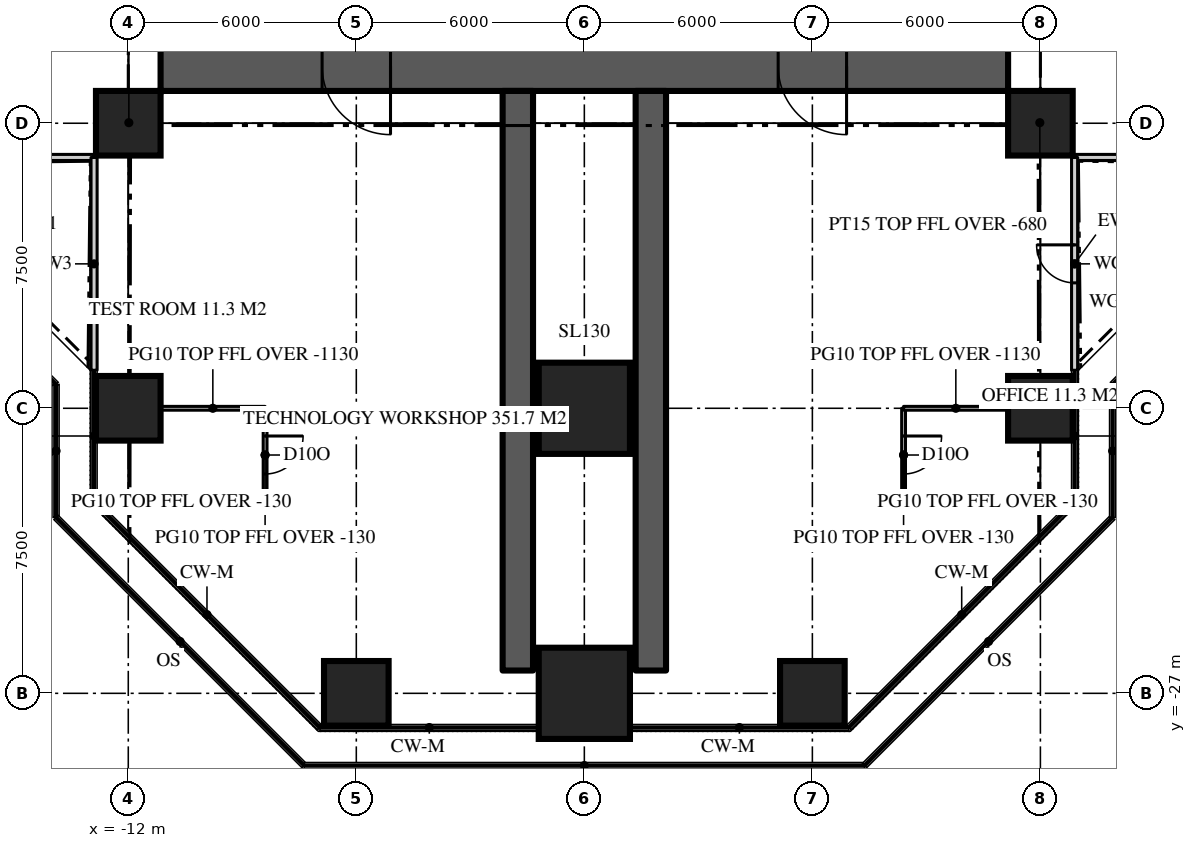
"""IFC4 building model, lengths in metres.
Left out: names, types, materials, properties, quantities, classifications, styles, units other than length and angle.
Written with IfcOpenShell. Run it as: python <this file> out.ifc"""

import sys

from ifc_helpers import new_model, si_unit, direction, frame, frame_2d, origin, origin_2d, place, context, subcontext, project, spatial, rectangle, extrude, element, fill, save


model = new_model("IFC4")
c1 = context("Model", 3, precision=1e-05, world=origin(), true_north=direction((0.0, 1.0)))
c2 = subcontext(c1, "Body", "Model", "MODEL_VIEW")
j1 = project(units=[si_unit("LENGTHUNIT", "METRE"), si_unit("PLANEANGLEUNIT", "RADIAN")], contexts=[c1])
p1 = place(None, origin())
s1 = spatial("IfcSite", under=j1, at=p1, CompositionType="ELEMENT")
p2 = place(p1, origin())
s2 = spatial("IfcBuilding", under=s1, at=p2, CompositionType="ELEMENT")
p3 = place(p2, frame((0.0, 0.0, 151.5)))
s3 = spatial("IfcBuildingStorey", under=s2, at=p3, CompositionType="ELEMENT", Elevation=151.5)
p4 = place(p3, frame((11.15, -10.5, 0.0), z_axis=(0.0, 0.0, 1.0), x_axis=(-1.0, 0.0, 0.0)))
e1 = element("IfcWall", 1, at=p4, inside=s3, PredefinedType="SHEAR", context=c2, shape_type="SweptSolid", body=[
    extrude(rectangle(XDim=22.3, YDim=1.3, at=frame_2d((11.15, 0.0))), origin(), (0.0, 0.0, 1.0), 3.9),
])
p5 = place(p4, frame((16.25, 0.0, 0.0)))
e2 = element("IfcOpeningElement", 2, at=p5, cuts=e1, PredefinedType="OPENING", context=c2, shape_type="SweptSolid", body=[
    extrude(rectangle(XDim=1.8, YDim=2.2, at=frame_2d((0.9, 1.1))), frame((0.0, 0.66, 0.0), z_axis=(0.0, -1.0, 0.0), x_axis=(1.0, 0.0, 0.0)), (0.0, 0.0, 1.0), 1.32),
])
p6 = place(p4, frame((4.25, 0.0, 0.0)))
e3 = element("IfcOpeningElement", 3, at=p6, cuts=e1, PredefinedType="OPENING", context=c2, shape_type="SweptSolid", body=[
    extrude(rectangle(XDim=1.8, YDim=2.2, at=frame_2d((0.9, 1.1))), frame((0.0, 0.66, 0.0), z_axis=(0.0, -1.0, 0.0), x_axis=(1.0, 0.0, 0.0)), (0.0, 0.0, 1.0), 1.32),
])
for number, where, z_axis, x_axis in (
    (4, (-1.75, -11.15, 0.0), (0.0, 0.0, 1.0), (0.0, -1.0, 0.0)),
    (5, (1.75, -11.15, 0.0), (0.0, 0.0, 1.0), (0.0, -1.0, 0.0)),
):
    element("IfcWall", number, at=place(p3, frame(where, z_axis=z_axis, x_axis=x_axis)), inside=s3, PredefinedType="SHEAR", context=c2, shape_type="SweptSolid", body=[
        extrude(rectangle(XDim=15.25, YDim=0.8, at=frame_2d((7.625, 0.0))), origin(), (0.0, 0.0, 1.0), 3.9),
    ])
p7 = place(p3, frame((-6.0, -27.0, 0.0), z_axis=(0.0, 0.0, 1.0), x_axis=(1.0, 0.0, 0.0)))
e6 = element("IfcColumn", 6, at=p7, inside=s3, PredefinedType="COLUMN", context=c2, shape_type="SweptSolid", body=[
    extrude(rectangle(XDim=1.7, YDim=1.7, at=origin_2d()), origin(), (0.0, 0.0, 1.0), 3.9),
])
p8 = place(p3, frame((0.0, -27.0, 0.0), z_axis=(0.0, 0.0, 1.0), x_axis=(1.0, 0.0, 0.0)))
e7 = element("IfcColumn", 7, at=p8, inside=s3, PredefinedType="COLUMN", context=c2, shape_type="SweptSolid", body=[
    extrude(rectangle(XDim=2.4, YDim=2.4, at=origin_2d()), origin(), (0.0, 0.0, 1.0), 3.9),
])
for number, where, z_axis, x_axis in (
    (8, (6.0, -27.0, 0.0), (0.0, 0.0, 1.0), (1.0, 0.0, 0.0)),
    (9, (-12.0, -19.5, 0.0), (0.0, 0.0, 1.0), (1.0, 0.0, 0.0)),
):
    element("IfcColumn", number, at=place(p3, frame(where, z_axis=z_axis, x_axis=x_axis)), inside=s3, PredefinedType="COLUMN", context=c2, shape_type="SweptSolid", body=[
        extrude(rectangle(XDim=1.7, YDim=1.7, at=origin_2d()), origin(), (0.0, 0.0, 1.0), 3.9),
    ])
p9 = place(p3, frame((0.0, -19.5, 0.0), z_axis=(0.0, 0.0, 1.0), x_axis=(1.0, 0.0, 0.0)))
e10 = element("IfcColumn", 10, at=p9, inside=s3, PredefinedType="COLUMN", context=c2, shape_type="SweptSolid", body=[
    extrude(rectangle(XDim=2.4, YDim=2.4, at=origin_2d()), origin(), (0.0, 0.0, 1.0), 3.9),
])
for number, where, z_axis, x_axis in (
    (11, (12.0, -19.5, 0.0), (0.0, 0.0, 1.0), (1.0, 0.0, 0.0)),
    (12, (-12.0, -12.0, 0.0), (0.0, 0.0, 1.0), (1.0, 0.0, 0.0)),
    (13, (12.0, -12.0, 0.0), (0.0, 0.0, 1.0), (1.0, 0.0, 0.0)),
):
    element("IfcColumn", number, at=place(p3, frame(where, z_axis=z_axis, x_axis=x_axis)), inside=s3, PredefinedType="COLUMN", context=c2, shape_type="SweptSolid", body=[
        extrude(rectangle(XDim=1.7, YDim=1.7, at=origin_2d()), origin(), (0.0, 0.0, 1.0), 3.9),
    ])
p10 = place(p3, frame((12.9, -12.9, 0.0), z_axis=(0.0, 0.0, 1.0), x_axis=(1.0, 0.0, 0.0)))
e14 = element("IfcWall", 14, at=p10, inside=s3, PredefinedType="SOLIDWALL", context=c2, shape_type="SweptSolid", body=[
    extrude(rectangle(XDim=5.6, YDim=0.16, at=frame_2d((2.8, 0.0))), origin(), (0.0, 0.0, 1.0), 3.77),
])
p11 = place(p3, frame((-18.5, -12.9, 0.0), z_axis=(0.0, 0.0, 1.0), x_axis=(1.0, 0.0, 0.0)))
e15 = element("IfcWall", 15, at=p11, inside=s3, PredefinedType="SOLIDWALL", context=c2, shape_type="SweptSolid", body=[
    extrude(rectangle(XDim=5.6, YDim=0.16, at=frame_2d((2.8, 0.0))), origin(), (0.0, 0.0, 1.0), 3.77),
])
p12 = place(p11, frame((2.3, 0.0, 0.0)))
e16 = element("IfcOpeningElement", 16, at=p12, cuts=e15, PredefinedType="OPENING", context=c2, shape_type="SweptSolid", body=[
    extrude(rectangle(XDim=1.0, YDim=2.2, at=frame_2d((0.5, 1.1))), frame((0.0, 0.09, 0.0), z_axis=(0.0, -1.0, 0.0), x_axis=(1.0, 0.0, 0.0)), (0.0, 0.0, 1.0), 0.18),
])
p13 = place(p3, frame((-12.9, -12.9, 0.0), z_axis=(0.0, 0.0, 1.0), x_axis=(0.0, -1.0, 0.0)))
e17 = element("IfcWall", 17, at=p13, inside=s3, PredefinedType="SOLIDWALL", context=c2, shape_type="SweptSolid", body=[
    extrude(rectangle(XDim=5.6, YDim=0.16, at=frame_2d((2.8, 0.0))), origin(), (0.0, 0.0, 1.0), 3.77),
])
p14 = place(p3, frame((12.9, -18.5, 0.0), z_axis=(0.0, 0.0, 1.0), x_axis=(0.0, 1.0, 0.0)))
e18 = element("IfcWall", 18, at=p14, inside=s3, PredefinedType="SOLIDWALL", context=c2, shape_type="SweptSolid", body=[
    extrude(rectangle(XDim=5.6, YDim=0.16, at=frame_2d((2.8, 0.0))), origin(), (0.0, 0.0, 1.0), 3.77),
])
p15 = place(p14, frame((2.3, 0.0, 0.0)))
e19 = element("IfcOpeningElement", 19, at=p15, cuts=e18, PredefinedType="OPENING", context=c2, shape_type="SweptSolid", body=[
    extrude(rectangle(XDim=1.0, YDim=2.2, at=frame_2d((0.5, 1.1))), frame((0.0, 0.09, 0.0), z_axis=(0.0, -1.0, 0.0), x_axis=(1.0, 0.0, 0.0)), (0.0, 0.0, 1.0), 0.18),
])
p16 = place(p3, frame((8.4, -19.5, 0.0), z_axis=(0.0, 0.0, 1.0), x_axis=(0.0, -1.0, 0.0)))
e20 = element("IfcWall", 20, at=p16, inside=s3, PredefinedType="PARTITIONING", context=c2, shape_type="SweptSolid", body=[
    extrude(rectangle(XDim=2.459, YDim=0.1, at=frame_2d((1.229, 0.0))), origin(), (0.0, 0.0, 1.0), 3.77),
])
p17 = place(p16, frame((0.729, 0.0, 0.0)))
e21 = element("IfcOpeningElement", 21, at=p17, cuts=e20, PredefinedType="OPENING", context=c2, shape_type="SweptSolid", body=[
    extrude(rectangle(XDim=1.0, YDim=2.2, at=frame_2d((0.5, 1.1))), frame((0.0, 0.06, 0.0), z_axis=(0.0, -1.0, 0.0), x_axis=(1.0, 0.0, 0.0)), (0.0, 0.0, 1.0), 0.12),
])
p18 = place(p3, frame((8.4, -19.5, 0.0), z_axis=(0.0, 0.0, 1.0), x_axis=(1.0, 0.0, 0.0)))
e22 = element("IfcWall", 22, at=p18, inside=s3, PredefinedType="PARTITIONING", context=c2, shape_type="SweptSolid", body=[
    extrude(rectangle(XDim=2.75, YDim=0.1, at=frame_2d((1.375, 0.0))), origin(), (0.0, 0.0, 1.0), 2.77),
])
p19 = place(p3, frame((8.4, -21.959, 0.0), z_axis=(0.0, 0.0, 1.0), x_axis=(1.0, 0.0, 0.0)))
e23 = element("IfcWall", 23, at=p19, inside=s3, PredefinedType="PARTITIONING", context=c2, shape_type="SweptSolid", body=[
    extrude(rectangle(XDim=4.42, YDim=0.1, at=frame_2d((2.21, 0.0))), origin(), (0.0, 0.0, 1.0), 3.77),
])
p20 = place(p3, frame((-8.4, -19.5, 0.0), z_axis=(0.0, 0.0, 1.0), x_axis=(0.0, -1.0, 0.0)))
e24 = element("IfcWall", 24, at=p20, inside=s3, PredefinedType="PARTITIONING", context=c2, shape_type="SweptSolid", body=[
    extrude(rectangle(XDim=2.459, YDim=0.1, at=frame_2d((1.229, 0.0))), origin(), (0.0, 0.0, 1.0), 3.77),
])
p21 = place(p20, frame((0.729, 0.0, 0.0)))
e25 = element("IfcOpeningElement", 25, at=p21, cuts=e24, PredefinedType="OPENING", context=c2, shape_type="SweptSolid", body=[
    extrude(rectangle(XDim=1.0, YDim=2.2, at=frame_2d((0.5, 1.1))), frame((0.0, 0.06, 0.0), z_axis=(0.0, -1.0, 0.0), x_axis=(1.0, 0.0, 0.0)), (0.0, 0.0, 1.0), 0.12),
])
p22 = place(p3, frame((-8.4, -19.5, 0.0), z_axis=(0.0, 0.0, 1.0), x_axis=(-1.0, 0.0, 0.0)))
e26 = element("IfcWall", 26, at=p22, inside=s3, PredefinedType="PARTITIONING", context=c2, shape_type="SweptSolid", body=[
    extrude(rectangle(XDim=2.75, YDim=0.1, at=frame_2d((1.375, 0.0))), origin(), (0.0, 0.0, 1.0), 2.77),
])
p23 = place(p3, frame((-8.4, -21.959, 0.0), z_axis=(0.0, 0.0, 1.0), x_axis=(-1.0, 0.0, 0.0)))
e27 = element("IfcWall", 27, at=p23, inside=s3, PredefinedType="PARTITIONING", context=c2, shape_type="SweptSolid", body=[
    extrude(rectangle(XDim=4.42, YDim=0.1, at=frame_2d((2.21, 0.0))), origin(), (0.0, 0.0, 1.0), 3.77),
])
for number, where, z_axis, x_axis in (
    (28, (-11.15, -11.15, 0.0), (0.0, 0.0, 1.0), (-0.707, -0.707, 0.0)),
    (29, (11.15, -11.15, 0.0), (0.0, 0.0, 1.0), (0.707, -0.707, 0.0)),
):
    element("IfcWall", number, at=place(p3, frame(where, z_axis=z_axis, x_axis=x_axis)), inside=s3, PredefinedType="PARTITIONING", context=c2, shape_type="SweptSolid", body=[
        extrude(rectangle(XDim=2.362, YDim=0.15, at=frame_2d((1.181, 0.0))), origin(), (0.0, 0.0, 1.0), 3.22),
    ])
p24 = place(p15, origin())
e30 = element("IfcDoor", 30, at=p24, inside=s3, OperationType="SINGLE_SWING_RIGHT", PredefinedType="DOOR", context=c2, shape_type="SweptSolid", body=[
    extrude(rectangle(XDim=1.0, YDim=2.2, at=frame_2d((0.5, 1.1))), frame((0.0, 0.025, 0.0), z_axis=(0.0, -1.0, 0.0), x_axis=(1.0, 0.0, 0.0)), (0.0, 0.0, 1.0), 0.05),
])
fill(e19, e30)
p25 = place(p5, origin())
e31 = element("IfcDoor", 31, at=p25, inside=s3, OperationType="DOUBLE_DOOR_DOUBLE_SWING", PredefinedType="DOOR", context=c2, shape_type="SweptSolid", body=[
    extrude(rectangle(XDim=1.8, YDim=2.2, at=frame_2d((0.9, 1.1))), frame((0.0, 0.025, 0.0), z_axis=(0.0, -1.0, 0.0), x_axis=(1.0, 0.0, 0.0)), (0.0, 0.0, 1.0), 0.05),
])
fill(e2, e31)
p26 = place(p6, origin())
e32 = element("IfcDoor", 32, at=p26, inside=s3, OperationType="DOUBLE_DOOR_DOUBLE_SWING", PredefinedType="DOOR", context=c2, shape_type="SweptSolid", body=[
    extrude(rectangle(XDim=1.8, YDim=2.2, at=frame_2d((0.9, 1.1))), frame((0.0, 0.025, 0.0), z_axis=(0.0, -1.0, 0.0), x_axis=(1.0, 0.0, 0.0)), (0.0, 0.0, 1.0), 0.05),
])
fill(e3, e32)
p27 = place(p17, origin())
e33 = element("IfcDoor", 33, at=p27, inside=s3, OperationType="SINGLE_SWING_LEFT", PredefinedType="DOOR", context=c2, shape_type="SweptSolid", body=[
    extrude(rectangle(XDim=1.0, YDim=2.2, at=frame_2d((0.5, 1.1))), frame((0.0, 0.025, 0.0), z_axis=(0.0, -1.0, 0.0), x_axis=(1.0, 0.0, 0.0)), (0.0, 0.0, 1.0), 0.05),
])
fill(e21, e33)
p28 = place(p21, origin())
e34 = element("IfcDoor", 34, at=p28, inside=s3, OperationType="SINGLE_SWING_LEFT", PredefinedType="DOOR", context=c2, shape_type="SweptSolid", body=[
    extrude(rectangle(XDim=1.0, YDim=2.2, at=frame_2d((0.5, 1.1))), frame((0.0, 0.025, 0.0), z_axis=(0.0, -1.0, 0.0), x_axis=(1.0, 0.0, 0.0)), (0.0, 0.0, 1.0), 0.05),
])
fill(e25, e34)
save(model, sys.argv[1])
